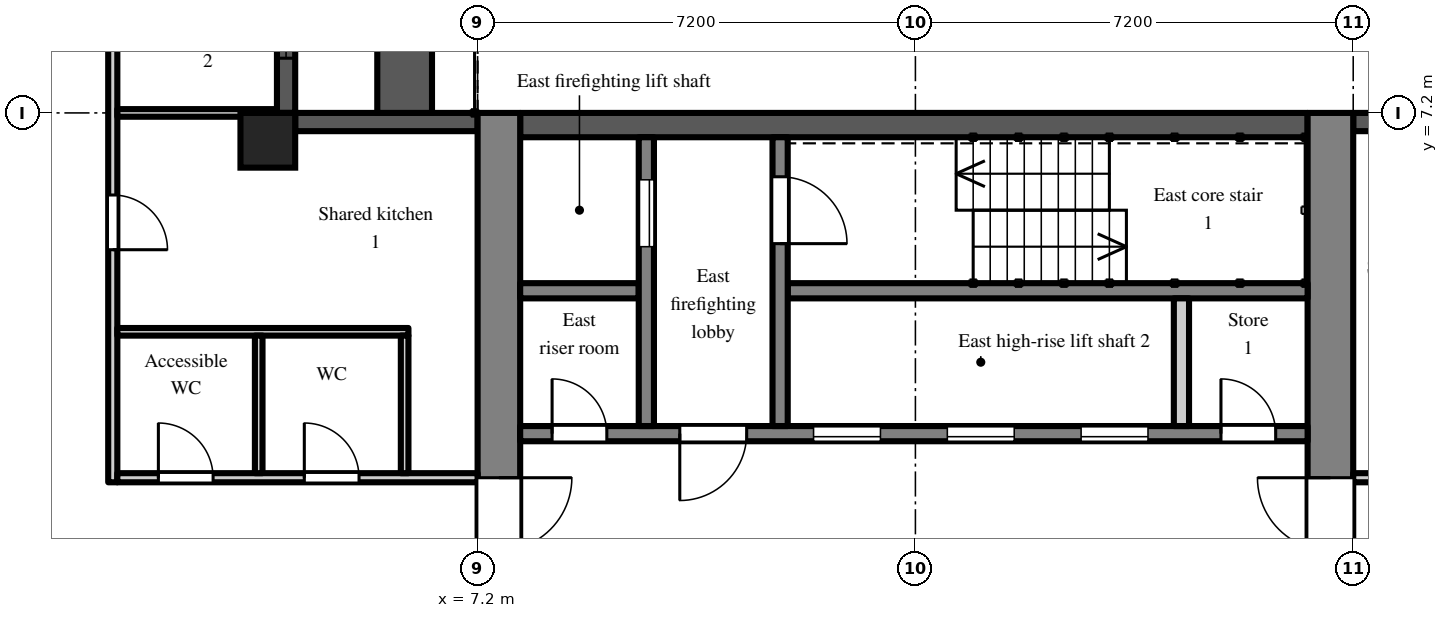
"""IFC4 building model, lengths in metres.
Left out: names, types, materials, properties, quantities, classifications, styles, units other than length and angle.
Written with IfcOpenShell. Run it as: python <this file> out.ifc"""

import sys

from ifc_helpers import new_model, si_unit, direction, frame, frame_2d, origin, origin_2d, place, context, subcontext, project, spatial, rectangle, extrude, element, fill, save


model = new_model("IFC4")
c1 = context("Model", 3, precision=1e-05, world=origin(), true_north=direction((0.0, 1.0)))
c2 = subcontext(c1, "Body", "Model", "MODEL_VIEW")
j1 = project(units=[si_unit("LENGTHUNIT", "METRE"), si_unit("PLANEANGLEUNIT", "RADIAN")], contexts=[c1])
p1 = place(None, origin())
s1 = spatial("IfcSite", under=j1, at=p1, CompositionType="ELEMENT")
p2 = place(p1, origin())
s2 = spatial("IfcBuilding", under=s1, at=p2, CompositionType="ELEMENT")
p3 = place(p2, frame((0.0, 0.0, 191.7)))
s3 = spatial("IfcBuildingStorey", under=s2, at=p3, CompositionType="ELEMENT", Elevation=191.7)
p4 = place(p3, frame((3.75, 6.75, 0.0), z_axis=(0.0, 0.0, 1.0), x_axis=(1.0, 0.0, 0.0)))
e1 = element("IfcColumn", 1, at=p4, inside=s3, PredefinedType="COLUMN", context=c2, shape_type="SweptSolid", body=[
    extrude(rectangle(XDim=0.9, YDim=0.9, at=origin_2d()), origin(), (0.0, 0.0, 1.0), 3.0),
])
p5 = place(p3, frame((24.3, 7.05, 0.0), z_axis=(0.0, 0.0, 1.0), x_axis=(-1.0, 0.0, 0.0)))
e2 = element("IfcWall", 2, at=p5, inside=s3, PredefinedType="SOLIDWALL", context=c2, shape_type="SweptSolid", body=[
    extrude(rectangle(XDim=2.7, YDim=0.3, at=frame_2d((1.35, 0.0))), origin(), (0.0, 0.0, 1.0), 2.3),
])
p6 = place(p5, frame((0.75, 0.0, 0.2)))
e3 = element("IfcOpeningElement", 3, at=p6, cuts=e2, PredefinedType="OPENING", context=c2, shape_type="SweptSolid", body=[
    extrude(rectangle(XDim=1.2, YDim=1.85, at=frame_2d((0.6, 0.925))), frame((0.0, 0.16, 0.0), z_axis=(0.0, -1.0, 0.0), x_axis=(1.0, 0.0, 0.0)), (0.0, 0.0, 1.0), 0.32),
])
p7 = place(p3, frame((7.2, 7.05, 0.0), z_axis=(0.0, 0.0, 1.0), x_axis=(-1.0, 0.0, 0.0)))
e4 = element("IfcWall", 4, at=p7, inside=s3, PredefinedType="SOLIDWALL", context=c2, shape_type="SweptSolid", body=[
    extrude(rectangle(XDim=3.0, YDim=0.3, at=frame_2d((1.5, 0.0))), origin(), (0.0, 0.0, 1.0), 2.55),
])
p8 = place(p3, frame((4.05, 7.2, 0.0), z_axis=(0.0, 0.0, 1.0), x_axis=(0.0, 1.0, 0.0)))
e5 = element("IfcWall", 5, at=p8, inside=s3, PredefinedType="SOLIDWALL", context=c2, shape_type="SweptSolid", body=[
    extrude(rectangle(XDim=7.2, YDim=0.3, at=frame_2d((3.6, 0.0))), origin(), (0.0, 0.0, 1.0), 2.55),
])
p9 = place(p8, frame((3.0, 0.0, 0.0)))
e6 = element("IfcOpeningElement", 6, at=p9, cuts=e5, PredefinedType="OPENING", context=c2, shape_type="SweptSolid", body=[
    extrude(rectangle(XDim=1.2, YDim=2.05, at=frame_2d((0.6, 1.025))), frame((0.0, 0.16, 0.0), z_axis=(0.0, -1.0, 0.0), x_axis=(1.0, 0.0, 0.0)), (0.0, 0.0, 1.0), 0.32),
])
p10 = place(p8, frame((0.9, 0.0, 0.2)))
e7 = element("IfcOpeningElement", 7, at=p10, cuts=e5, PredefinedType="OPENING", context=c2, shape_type="SweptSolid", body=[
    extrude(rectangle(XDim=1.8, YDim=1.85, at=frame_2d((0.9, 0.925))), frame((0.0, 0.16, 0.0), z_axis=(0.0, -1.0, 0.0), x_axis=(1.0, 0.0, 0.0)), (0.0, 0.0, 1.0), 0.32),
])
p11 = place(p8, frame((4.5, 0.0, 0.2)))
e8 = element("IfcOpeningElement", 8, at=p11, cuts=e5, PredefinedType="OPENING", context=c2, shape_type="SweptSolid", body=[
    extrude(rectangle(XDim=1.8, YDim=1.85, at=frame_2d((0.9, 0.925))), frame((0.0, 0.16, 0.0), z_axis=(0.0, -1.0, 0.0), x_axis=(1.0, 0.0, 0.0)), (0.0, 0.0, 1.0), 0.32),
])
p12 = place(p3, frame((6.0, 7.2, 0.0), z_axis=(0.0, 0.0, 1.0), x_axis=(0.0, 1.0, 0.0)))
e9 = element("IfcWall", 9, at=p12, inside=s3, PredefinedType="PARAPET", context=c2, shape_type="SweptSolid", body=[
    extrude(rectangle(XDim=7.2, YDim=0.9, at=frame_2d((3.6, 0.0))), origin(), (0.0, 0.0, 1.0), 0.8),
])
p13 = place(p3, frame((7.55, -7.2, 0.0), z_axis=(0.0, 0.0, 1.0), x_axis=(0.0, 1.0, 0.0)))
e10 = element("IfcWall", 10, at=p13, inside=s3, PredefinedType="SHEAR", context=c2, shape_type="SweptSolid", body=[
    extrude(rectangle(XDim=14.4, YDim=0.7, at=frame_2d((7.2, 0.0))), origin(), (0.0, 0.0, 1.0), 2.55),
])
p14 = place(p13, frame((6.0, 0.0, 0.0)))
e11 = element("IfcOpeningElement", 11, at=p14, cuts=e10, PredefinedType="OPENING", context=c2, shape_type="SweptSolid", body=[
    extrude(rectangle(XDim=2.4, YDim=2.2, at=frame_2d((1.2, 1.1))), frame((0.0, 0.36, 0.0), z_axis=(0.0, -1.0, 0.0), x_axis=(1.0, 0.0, 0.0)), (0.0, 0.0, 1.0), 0.72),
])
p15 = place(p3, frame((21.225, -7.2, 0.0), z_axis=(0.0, 0.0, 1.0), x_axis=(0.0, 1.0, 0.0)))
e12 = element("IfcWall", 12, at=p15, inside=s3, PredefinedType="SHEAR", context=c2, shape_type="SweptSolid", body=[
    extrude(rectangle(XDim=14.4, YDim=0.75, at=frame_2d((7.2, 0.0))), origin(), (0.0, 0.0, 1.0), 2.55),
])
p16 = place(p15, frame((6.0, 0.0, 0.0)))
e13 = element("IfcOpeningElement", 13, at=p16, cuts=e12, PredefinedType="OPENING", context=c2, shape_type="SweptSolid", body=[
    extrude(rectangle(XDim=2.4, YDim=2.2, at=frame_2d((1.2, 1.1))), frame((0.0, 0.385, 0.0), z_axis=(0.0, -1.0, 0.0), x_axis=(1.0, 0.0, 0.0)), (0.0, 0.0, 1.0), 0.77),
])
p17 = place(p3, frame((7.9, 7.0, 0.0), z_axis=(0.0, 0.0, 1.0), x_axis=(1.0, 0.0, 0.0)))
e14 = element("IfcWall", 14, at=p17, inside=s3, PredefinedType="SHEAR", context=c2, shape_type="SweptSolid", body=[
    extrude(rectangle(XDim=12.95, YDim=0.4, at=frame_2d((6.475, 0.0))), origin(), (0.0, 0.0, 1.0), 2.55),
])
p18 = place(p3, frame((7.9, 1.925, 0.0), z_axis=(0.0, 0.0, 1.0), x_axis=(1.0, 0.0, 0.0)))
e15 = element("IfcWall", 15, at=p18, inside=s3, PredefinedType="SHEAR", context=c2, shape_type="SweptSolid", body=[
    extrude(rectangle(XDim=12.95, YDim=0.25, at=frame_2d((6.475, 0.0))), origin(), (0.0, 0.0, 1.0), 2.55),
])
p19 = place(p18, frame((4.825, 0.0, 0.0)))
e16 = element("IfcOpeningElement", 16, at=p19, cuts=e15, PredefinedType="OPENING", context=c2, shape_type="SweptSolid", body=[
    extrude(rectangle(XDim=1.1, YDim=2.1, at=frame_2d((0.55, 1.05))), frame((0.0, 0.135, 0.0), z_axis=(0.0, -1.0, 0.0), x_axis=(1.0, 0.0, 0.0)), (0.0, 0.0, 1.0), 0.27),
])
p20 = place(p18, frame((7.025, 0.0, 0.0)))
e17 = element("IfcOpeningElement", 17, at=p20, cuts=e15, PredefinedType="OPENING", context=c2, shape_type="SweptSolid", body=[
    extrude(rectangle(XDim=1.1, YDim=2.1, at=frame_2d((0.55, 1.05))), frame((0.0, 0.135, 0.0), z_axis=(0.0, -1.0, 0.0), x_axis=(1.0, 0.0, 0.0)), (0.0, 0.0, 1.0), 0.27),
])
p21 = place(p18, frame((9.225, 0.0, 0.0)))
e18 = element("IfcOpeningElement", 18, at=p21, cuts=e15, PredefinedType="OPENING", context=c2, shape_type="SweptSolid", body=[
    extrude(rectangle(XDim=1.1, YDim=2.1, at=frame_2d((0.55, 1.05))), frame((0.0, 0.135, 0.0), z_axis=(0.0, -1.0, 0.0), x_axis=(1.0, 0.0, 0.0)), (0.0, 0.0, 1.0), 0.27),
])
p22 = place(p18, frame((0.525, 0.0, 0.0)))
e19 = element("IfcOpeningElement", 19, at=p22, cuts=e15, PredefinedType="OPENING", context=c2, shape_type="SweptSolid", body=[
    extrude(rectangle(XDim=0.9, YDim=2.1, at=frame_2d((0.45, 1.05))), frame((0.0, 0.135, 0.0), z_axis=(0.0, -1.0, 0.0), x_axis=(1.0, 0.0, 0.0)), (0.0, 0.0, 1.0), 0.27),
])
p23 = place(p18, frame((2.625, 0.0, 0.0)))
e20 = element("IfcOpeningElement", 20, at=p23, cuts=e15, PredefinedType="OPENING", context=c2, shape_type="SweptSolid", body=[
    extrude(rectangle(XDim=1.1, YDim=2.1, at=frame_2d((0.55, 1.05))), frame((0.0, 0.135, 0.0), z_axis=(0.0, -1.0, 0.0), x_axis=(1.0, 0.0, 0.0)), (0.0, 0.0, 1.0), 0.27),
])
p24 = place(p18, frame((11.525, 0.0, 0.0)))
e21 = element("IfcOpeningElement", 21, at=p24, cuts=e15, PredefinedType="OPENING", context=c2, shape_type="SweptSolid", body=[
    extrude(rectangle(XDim=0.9, YDim=2.1, at=frame_2d((0.45, 1.05))), frame((0.0, 0.135, 0.0), z_axis=(0.0, -1.0, 0.0), x_axis=(1.0, 0.0, 0.0)), (0.0, 0.0, 1.0), 0.27),
])
p25 = place(p3, frame((7.9, 4.275, 0.0), z_axis=(0.0, 0.0, 1.0), x_axis=(1.0, 0.0, 0.0)))
e22 = element("IfcWall", 22, at=p25, inside=s3, PredefinedType="SHEAR", context=c2, shape_type="SweptSolid", body=[
    extrude(rectangle(XDim=1.95, YDim=0.25, at=frame_2d((0.975, 0.0))), origin(), (0.0, 0.0, 1.0), 2.55),
])
p26 = place(p3, frame((12.3, 4.275, 0.0), z_axis=(0.0, 0.0, 1.0), x_axis=(1.0, 0.0, 0.0)))
e23 = element("IfcWall", 23, at=p26, inside=s3, PredefinedType="SHEAR", context=c2, shape_type="SweptSolid", body=[
    extrude(rectangle(XDim=8.55, YDim=0.25, at=frame_2d((4.275, 0.0))), origin(), (0.0, 0.0, 1.0), 2.55),
])
p27 = place(p3, frame((9.975, 2.05, 0.0), z_axis=(0.0, 0.0, 1.0), x_axis=(0.0, 1.0, 0.0)))
e24 = element("IfcWall", 24, at=p27, inside=s3, PredefinedType="SHEAR", context=c2, shape_type="SweptSolid", body=[
    extrude(rectangle(XDim=4.75, YDim=0.25, at=frame_2d((2.375, 0.0))), origin(), (0.0, 0.0, 1.0), 2.55),
])
p28 = place(p27, frame((2.95, 0.0, 0.0)))
e25 = element("IfcOpeningElement", 25, at=p28, cuts=e24, PredefinedType="OPENING", context=c2, shape_type="SweptSolid", body=[
    extrude(rectangle(XDim=1.1, YDim=2.1, at=frame_2d((0.55, 1.05))), frame((0.0, 0.135, 0.0), z_axis=(0.0, -1.0, 0.0), x_axis=(1.0, 0.0, 0.0)), (0.0, 0.0, 1.0), 0.27),
])
p29 = place(p3, frame((12.175, 2.05, 0.0), z_axis=(0.0, 0.0, 1.0), x_axis=(0.0, 1.0, 0.0)))
e26 = element("IfcWall", 26, at=p29, inside=s3, PredefinedType="SHEAR", context=c2, shape_type="SweptSolid", body=[
    extrude(rectangle(XDim=4.75, YDim=0.25, at=frame_2d((2.375, 0.0))), origin(), (0.0, 0.0, 1.0), 2.55),
])
p30 = place(p29, frame((3.0, 0.0, 0.0)))
e27 = element("IfcOpeningElement", 27, at=p30, cuts=e26, PredefinedType="OPENING", context=c2, shape_type="SweptSolid", body=[
    extrude(rectangle(XDim=1.1, YDim=2.1, at=frame_2d((0.55, 1.05))), frame((0.0, 0.135, 0.0), z_axis=(0.0, -1.0, 0.0), x_axis=(1.0, 0.0, 0.0)), (0.0, 0.0, 1.0), 0.27),
])
p31 = place(p3, frame((18.775, 2.05, 0.0), z_axis=(0.0, 0.0, 1.0), x_axis=(0.0, 1.0, 0.0)))
e28 = element("IfcWall", 28, at=p31, inside=s3, PredefinedType="PARTITIONING", context=c2, shape_type="SweptSolid", body=[
    extrude(rectangle(XDim=2.1, YDim=0.25, at=frame_2d((1.05, 0.0))), origin(), (0.0, 0.0, 1.0), 2.55),
])
p32 = place(p3, frame((1.2, 1.125, 0.0), z_axis=(0.0, 0.0, 1.0), x_axis=(0.0, 1.0, 0.0)))
e29 = element("IfcWall", 29, at=p32, inside=s3, PredefinedType="PARTITIONING", context=c2, shape_type="SweptSolid", body=[
    extrude(rectangle(XDim=18.4, YDim=0.15, at=frame_2d((9.2, 0.0))), origin(), (0.0, 0.0, 1.0), 2.55),
])
p33 = place(p32, frame((3.825, 0.0, 0.0)))
e30 = element("IfcOpeningElement", 30, at=p33, cuts=e29, PredefinedType="OPENING", context=c2, shape_type="SweptSolid", body=[
    extrude(rectangle(XDim=0.9, YDim=2.1, at=frame_2d((0.45, 1.05))), frame((0.0, 0.085, 0.0), z_axis=(0.0, -1.0, 0.0), x_axis=(1.0, 0.0, 0.0)), (0.0, 0.0, 1.0), 0.17),
])
p34 = place(p32, frame((11.425, 0.0, 0.0)))
e31 = element("IfcOpeningElement", 31, at=p34, cuts=e29, PredefinedType="OPENING", context=c2, shape_type="SweptSolid", body=[
    extrude(rectangle(XDim=0.9, YDim=2.1, at=frame_2d((0.45, 1.05))), frame((0.0, 0.085, 0.0), z_axis=(0.0, -1.0, 0.0), x_axis=(1.0, 0.0, 0.0)), (0.0, 0.0, 1.0), 0.17),
])
p35 = place(p32, frame((7.825, 0.0, 0.0)))
e32 = element("IfcOpeningElement", 32, at=p35, cuts=e29, PredefinedType="OPENING", context=c2, shape_type="SweptSolid", body=[
    extrude(rectangle(XDim=0.9, YDim=2.1, at=frame_2d((0.45, 1.05))), frame((0.0, 0.085, 0.0), z_axis=(0.0, -1.0, 0.0), x_axis=(1.0, 0.0, 0.0)), (0.0, 0.0, 1.0), 0.17),
])
p36 = place(p32, frame((14.625, 0.0, 0.0)))
e33 = element("IfcOpeningElement", 33, at=p36, cuts=e29, PredefinedType="OPENING", context=c2, shape_type="SweptSolid", body=[
    extrude(rectangle(XDim=0.9, YDim=2.1, at=frame_2d((0.45, 1.05))), frame((0.0, 0.085, 0.0), z_axis=(0.0, -1.0, 0.0), x_axis=(1.0, 0.0, 0.0)), (0.0, 0.0, 1.0), 0.17),
])
p37 = place(p32, frame((17.225, 0.0, 0.0)))
e34 = element("IfcOpeningElement", 34, at=p37, cuts=e29, PredefinedType="OPENING", context=c2, shape_type="SweptSolid", body=[
    extrude(rectangle(XDim=0.9, YDim=2.1, at=frame_2d((0.45, 1.05))), frame((0.0, 0.085, 0.0), z_axis=(0.0, -1.0, 0.0), x_axis=(1.0, 0.0, 0.0)), (0.0, 0.0, 1.0), 0.17),
])
p38 = place(p3, frame((1.275, 1.2, 0.0), z_axis=(0.0, 0.0, 1.0), x_axis=(1.0, 0.0, 0.0)))
e35 = element("IfcWall", 35, at=p38, inside=s3, PredefinedType="PARTITIONING", context=c2, shape_type="SweptSolid", body=[
    extrude(rectangle(XDim=5.925, YDim=0.15, at=frame_2d((2.962, 0.0))), origin(), (0.0, 0.0, 1.0), 2.55),
])
p39 = place(p38, frame((0.675, 0.0, 0.0)))
e36 = element("IfcOpeningElement", 36, at=p39, cuts=e35, PredefinedType="OPENING", context=c2, shape_type="SweptSolid", body=[
    extrude(rectangle(XDim=0.9, YDim=2.1, at=frame_2d((0.45, 1.05))), frame((0.0, 0.085, 0.0), z_axis=(0.0, -1.0, 0.0), x_axis=(1.0, 0.0, 0.0)), (0.0, 0.0, 1.0), 0.17),
])
p40 = place(p38, frame((3.075, 0.0, 0.0)))
e37 = element("IfcOpeningElement", 37, at=p40, cuts=e35, PredefinedType="OPENING", context=c2, shape_type="SweptSolid", body=[
    extrude(rectangle(XDim=0.9, YDim=2.1, at=frame_2d((0.45, 1.05))), frame((0.0, 0.085, 0.0), z_axis=(0.0, -1.0, 0.0), x_axis=(1.0, 0.0, 0.0)), (0.0, 0.0, 1.0), 0.17),
])
p41 = place(p3, frame((1.275, 3.6, 0.0), z_axis=(0.0, 0.0, 1.0), x_axis=(1.0, 0.0, 0.0)))
e38 = element("IfcWall", 38, at=p41, inside=s3, PredefinedType="PARTITIONING", context=c2, shape_type="SweptSolid", body=[
    extrude(rectangle(XDim=4.788, YDim=0.125, at=frame_2d((2.394, 0.0))), origin(), (0.0, 0.0, 1.0), 2.55),
])
p42 = place(p3, frame((1.275, 7.2, 0.0), z_axis=(0.0, 0.0, 1.0), x_axis=(1.0, 0.0, 0.0)))
e39 = element("IfcWall", 39, at=p42, inside=s3, PredefinedType="PARTITIONING", context=c2, shape_type="SweptSolid", body=[
    extrude(rectangle(XDim=2.625, YDim=0.125, at=frame_2d((1.312, 0.0))), origin(), (0.0, 0.0, 1.0), 2.55),
])
for number, where, z_axis, x_axis in (
    (40, (3.6, 1.275, 0.0), (0.0, 0.0, 1.0), (0.0, 1.0, 0.0)),
    (41, (6.0, 1.275, 0.0), (0.0, 0.0, 1.0), (0.0, 1.0, 0.0)),
):
    element("IfcWall", number, at=place(p3, frame(where, z_axis=z_axis, x_axis=x_axis)), inside=s3, PredefinedType="PARTITIONING", context=c2, shape_type="SweptSolid", body=[
        extrude(rectangle(XDim=2.263, YDim=0.125, at=frame_2d((1.131, 0.0))), origin(), (0.0, 0.0, 1.0), 2.55),
    ])
p43 = place(p3, frame((21.6, 1.2, 0.0), z_axis=(0.0, 0.0, 1.0), x_axis=(1.0, 0.0, 0.0)))
e42 = element("IfcWall", 42, at=p43, inside=s3, PredefinedType="PARTITIONING", context=c2, shape_type="SweptSolid", body=[
    extrude(rectangle(XDim=5.125, YDim=0.15, at=frame_2d((2.562, 0.0))), origin(), (0.0, 0.0, 1.0), 2.55),
])
p44 = place(p43, frame((0.6, 0.0, 0.0)))
e43 = element("IfcOpeningElement", 43, at=p44, cuts=e42, PredefinedType="OPENING", context=c2, shape_type="SweptSolid", body=[
    extrude(rectangle(XDim=1.0, YDim=2.1, at=frame_2d((0.5, 1.05))), frame((0.0, 0.085, 0.0), z_axis=(0.0, -1.0, 0.0), x_axis=(1.0, 0.0, 0.0)), (0.0, 0.0, 1.0), 0.17),
])
p45 = place(p10, origin())
e44 = element("IfcWindow", 44, at=p45, inside=s3, PartitioningType="SINGLE_PANEL", PredefinedType="WINDOW", context=c2, shape_type="SweptSolid", body=[
    extrude(rectangle(XDim=1.8, YDim=1.85, at=frame_2d((0.9, 0.925))), frame((0.0, 0.03, 0.0), z_axis=(0.0, -1.0, 0.0), x_axis=(1.0, 0.0, 0.0)), (0.0, 0.0, 1.0), 0.06),
])
fill(e7, e44)
p46 = place(p19, origin())
e45 = element("IfcDoor", 45, at=p46, inside=s3, OperationType="SLIDING_TO_LEFT", PredefinedType="DOOR", context=c2, shape_type="SweptSolid", body=[
    extrude(rectangle(XDim=1.1, YDim=2.1, at=frame_2d((0.55, 1.05))), frame((0.0, 0.025, 0.0), z_axis=(0.0, -1.0, 0.0), x_axis=(1.0, 0.0, 0.0)), (0.0, 0.0, 1.0), 0.05),
])
fill(e16, e45)
p47 = place(p20, origin())
e46 = element("IfcDoor", 46, at=p47, inside=s3, OperationType="SLIDING_TO_LEFT", PredefinedType="DOOR", context=c2, shape_type="SweptSolid", body=[
    extrude(rectangle(XDim=1.1, YDim=2.1, at=frame_2d((0.55, 1.05))), frame((0.0, 0.025, 0.0), z_axis=(0.0, -1.0, 0.0), x_axis=(1.0, 0.0, 0.0)), (0.0, 0.0, 1.0), 0.05),
])
fill(e17, e46)
p48 = place(p21, origin())
e47 = element("IfcDoor", 47, at=p48, inside=s3, OperationType="SLIDING_TO_LEFT", PredefinedType="DOOR", context=c2, shape_type="SweptSolid", body=[
    extrude(rectangle(XDim=1.1, YDim=2.1, at=frame_2d((0.55, 1.05))), frame((0.0, 0.025, 0.0), z_axis=(0.0, -1.0, 0.0), x_axis=(1.0, 0.0, 0.0)), (0.0, 0.0, 1.0), 0.05),
])
fill(e18, e47)
p49 = place(p28, origin())
e48 = element("IfcDoor", 48, at=p49, inside=s3, OperationType="SLIDING_TO_LEFT", PredefinedType="DOOR", context=c2, shape_type="SweptSolid", body=[
    extrude(rectangle(XDim=1.1, YDim=2.1, at=frame_2d((0.55, 1.05))), frame((0.0, 0.025, 0.0), z_axis=(0.0, -1.0, 0.0), x_axis=(1.0, 0.0, 0.0)), (0.0, 0.0, 1.0), 0.05),
])
fill(e25, e48)
p50 = place(p30, frame((1.1, 0.0, 0.0), z_axis=(0.0, 0.0, 1.0), x_axis=(-1.0, 0.0, 0.0)))
e49 = element("IfcDoor", 49, at=p50, inside=s3, OperationType="SINGLE_SWING_RIGHT", PredefinedType="DOOR", context=c2, shape_type="SweptSolid", body=[
    extrude(rectangle(XDim=1.1, YDim=2.1, at=frame_2d((0.55, 1.05))), frame((0.0, 0.025, 0.0), z_axis=(0.0, -1.0, 0.0), x_axis=(1.0, 0.0, 0.0)), (0.0, 0.0, 1.0), 0.05),
])
fill(e27, e49)
p51 = place(p22, origin())
e50 = element("IfcDoor", 50, at=p51, inside=s3, OperationType="SINGLE_SWING_LEFT", PredefinedType="DOOR", context=c2, shape_type="SweptSolid", body=[
    extrude(rectangle(XDim=0.9, YDim=2.1, at=frame_2d((0.45, 1.05))), frame((0.0, 0.025, 0.0), z_axis=(0.0, -1.0, 0.0), x_axis=(1.0, 0.0, 0.0)), (0.0, 0.0, 1.0), 0.05),
])
fill(e19, e50)
p52 = place(p23, frame((1.1, 0.0, 0.0), z_axis=(0.0, 0.0, 1.0), x_axis=(-1.0, 0.0, 0.0)))
e51 = element("IfcDoor", 51, at=p52, inside=s3, OperationType="SINGLE_SWING_RIGHT", PredefinedType="DOOR", context=c2, shape_type="SweptSolid", body=[
    extrude(rectangle(XDim=1.1, YDim=2.1, at=frame_2d((0.55, 1.05))), frame((0.0, 0.025, 0.0), z_axis=(0.0, -1.0, 0.0), x_axis=(1.0, 0.0, 0.0)), (0.0, 0.0, 1.0), 0.05),
])
fill(e20, e51)
p53 = place(p14, frame((2.4, 0.0, 0.0), z_axis=(0.0, 0.0, 1.0), x_axis=(-1.0, 0.0, 0.0)))
e52 = element("IfcDoor", 52, at=p53, inside=s3, OperationType="DOUBLE_DOOR_DOUBLE_SWING", PredefinedType="DOOR", context=c2, shape_type="SweptSolid", body=[
    extrude(rectangle(XDim=2.4, YDim=2.2, at=frame_2d((1.2, 1.1))), frame((0.0, 0.025, 0.0), z_axis=(0.0, -1.0, 0.0), x_axis=(1.0, 0.0, 0.0)), (0.0, 0.0, 1.0), 0.05),
])
fill(e11, e52)
p54 = place(p16, origin())
e53 = element("IfcDoor", 53, at=p54, inside=s3, OperationType="DOUBLE_DOOR_DOUBLE_SWING", PredefinedType="DOOR", context=c2, shape_type="SweptSolid", body=[
    extrude(rectangle(XDim=2.4, YDim=2.2, at=frame_2d((1.2, 1.1))), frame((0.0, 0.025, 0.0), z_axis=(0.0, -1.0, 0.0), x_axis=(1.0, 0.0, 0.0)), (0.0, 0.0, 1.0), 0.05),
])
fill(e13, e53)
p55 = place(p24, origin())
e54 = element("IfcDoor", 54, at=p55, inside=s3, OperationType="SINGLE_SWING_LEFT", PredefinedType="DOOR", context=c2, shape_type="SweptSolid", body=[
    extrude(rectangle(XDim=0.9, YDim=2.1, at=frame_2d((0.45, 1.05))), frame((0.0, 0.025, 0.0), z_axis=(0.0, -1.0, 0.0), x_axis=(1.0, 0.0, 0.0)), (0.0, 0.0, 1.0), 0.05),
])
fill(e21, e54)
p56 = place(p39, origin())
e55 = element("IfcDoor", 55, at=p56, inside=s3, OperationType="SINGLE_SWING_LEFT", PredefinedType="DOOR", context=c2, shape_type="SweptSolid", body=[
    extrude(rectangle(XDim=0.9, YDim=2.1, at=frame_2d((0.45, 1.05))), frame((0.0, 0.025, 0.0), z_axis=(0.0, -1.0, 0.0), x_axis=(1.0, 0.0, 0.0)), (0.0, 0.0, 1.0), 0.05),
])
fill(e36, e55)
p57 = place(p40, origin())
e56 = element("IfcDoor", 56, at=p57, inside=s3, OperationType="SINGLE_SWING_LEFT", PredefinedType="DOOR", context=c2, shape_type="SweptSolid", body=[
    extrude(rectangle(XDim=0.9, YDim=2.1, at=frame_2d((0.45, 1.05))), frame((0.0, 0.025, 0.0), z_axis=(0.0, -1.0, 0.0), x_axis=(1.0, 0.0, 0.0)), (0.0, 0.0, 1.0), 0.05),
])
fill(e37, e56)
p58 = place(p33, frame((0.9, 0.0, 0.0), z_axis=(0.0, 0.0, 1.0), x_axis=(-1.0, 0.0, 0.0)))
e57 = element("IfcDoor", 57, at=p58, inside=s3, OperationType="SINGLE_SWING_RIGHT", PredefinedType="DOOR", context=c2, shape_type="SweptSolid", body=[
    extrude(rectangle(XDim=0.9, YDim=2.1, at=frame_2d((0.45, 1.05))), frame((0.0, 0.025, 0.0), z_axis=(0.0, -1.0, 0.0), x_axis=(1.0, 0.0, 0.0)), (0.0, 0.0, 1.0), 0.05),
])
fill(e30, e57)
save(model, sys.argv[1])
